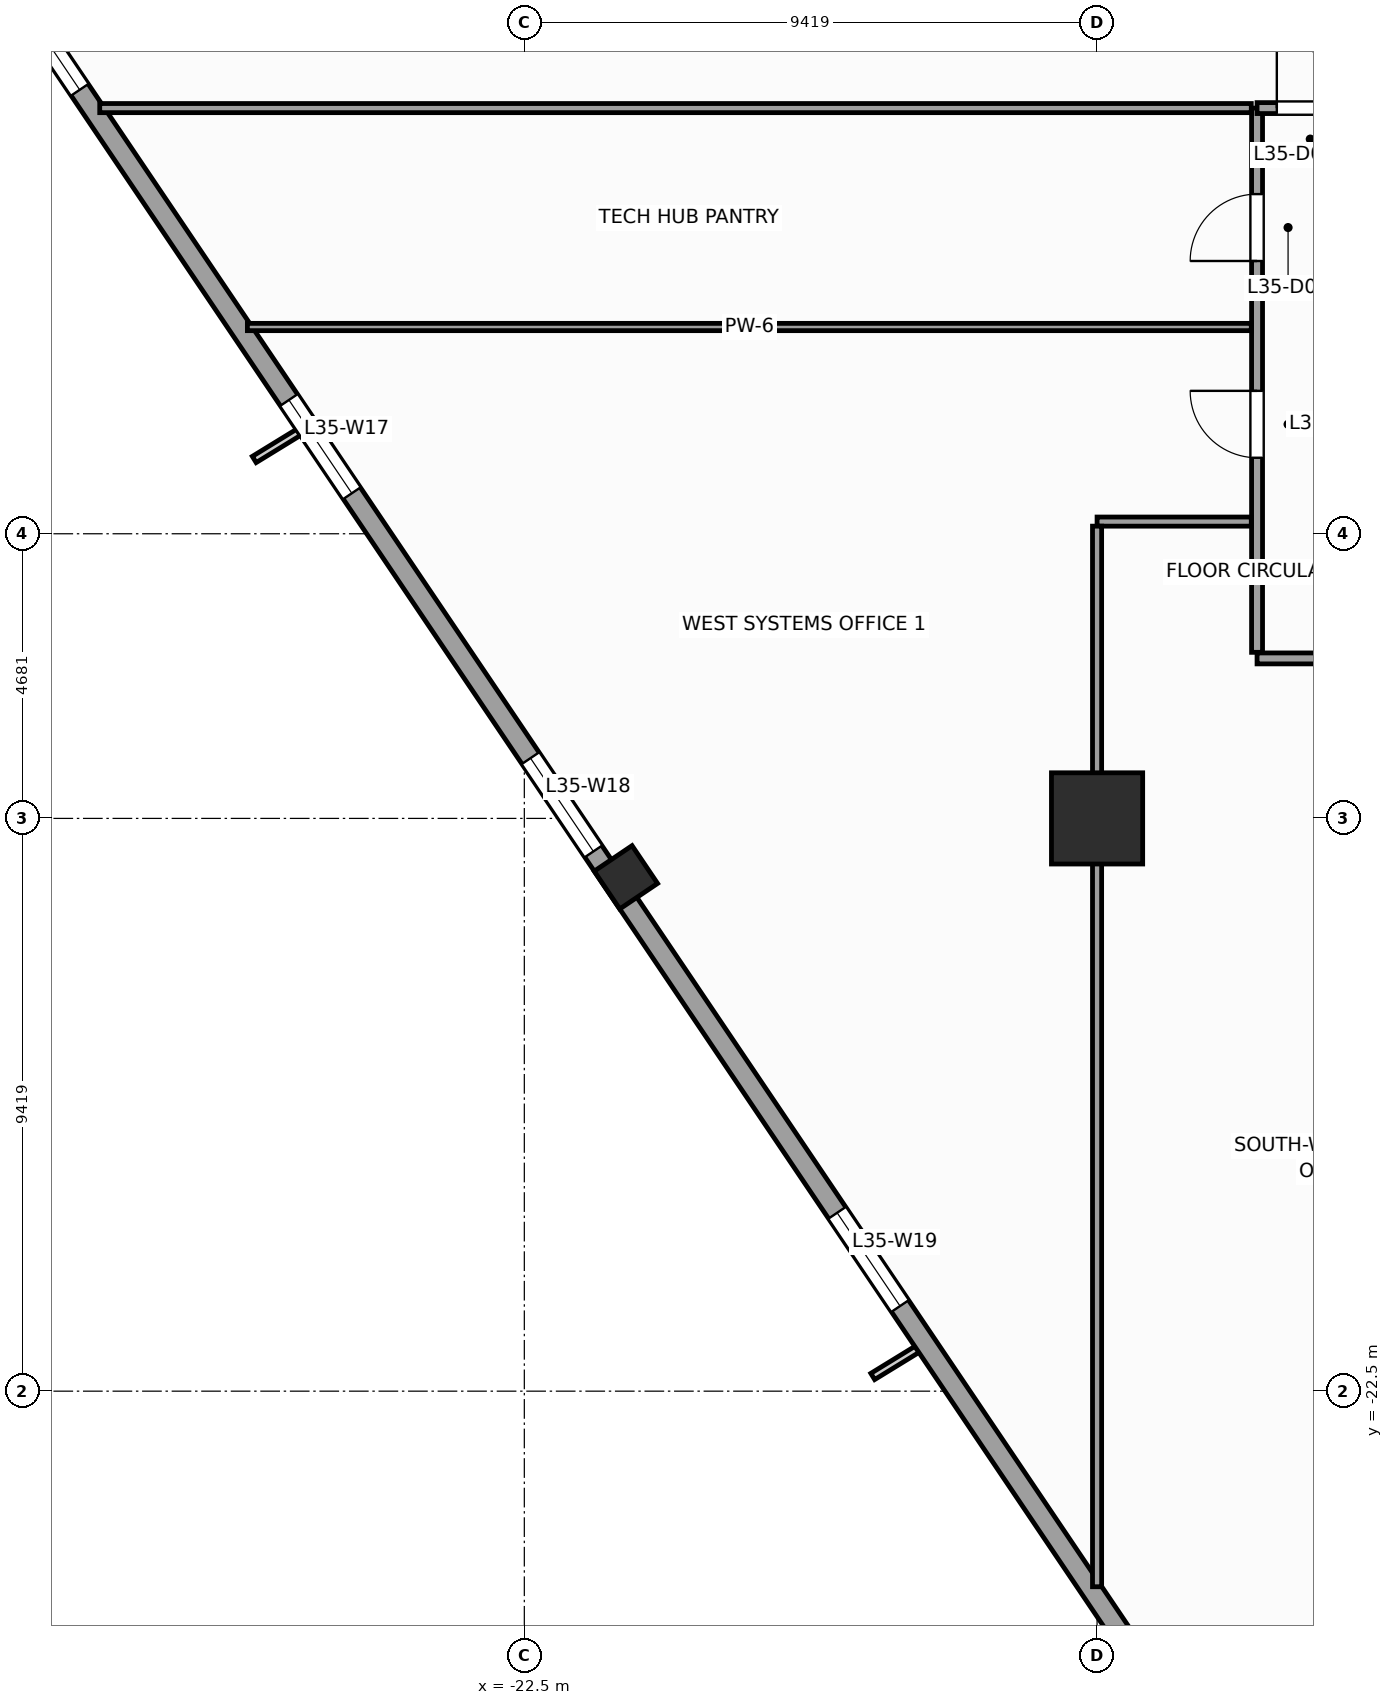
"""IFC4 building model, lengths in metres.
Left out: names, types, materials, properties, quantities, classifications, styles, units other than length and angle.
Written with IfcOpenShell. Run it as: python <this file> out.ifc"""

import sys

from ifc_helpers import new_model, si_unit, direction, frame, frame_2d, origin, origin_2d, place, context, subcontext, project, spatial, rectangle, extrude, source, transform, mapped, element, fill, save


model = new_model("IFC4")
c1 = context("Model", 3, precision=1e-05, world=origin(), true_north=direction((0.0, 1.0)))
c2 = subcontext(c1, "Body", "Model", "MODEL_VIEW")
j1 = project(units=[si_unit("LENGTHUNIT", "METRE"), si_unit("PLANEANGLEUNIT", "RADIAN")], contexts=[c1])
p1 = place(None, origin())
s1 = spatial("IfcSite", under=j1, at=p1, CompositionType="ELEMENT")
p2 = place(p1, origin())
s2 = spatial("IfcBuilding", under=s1, at=p2, CompositionType="ELEMENT")
p3 = place(p2, frame((0.0, 0.0, 148.4)))
s3 = spatial("IfcBuildingStorey", under=s2, at=p3, CompositionType="ELEMENT", Elevation=148.4)
m1 = source(origin(), c2, "Body", "SweptSolid", [
    extrude(rectangle(XDim=1.5, YDim=1.5, at=origin_2d()), origin(), (0.0, 0.0, 1.0), 4.0),
])
p4 = place(p3, frame((-13.081, -13.081, 0.0), z_axis=(0.0, 0.0, 1.0), x_axis=(1.0, 0.0, 0.0)))
e1 = element("IfcColumn", 1, at=p4, inside=s3, PredefinedType="COLUMN", context=c2, shape_type="MappedRepresentation", body=[
    mapped(m1, transform((0.0, 0.0, 0.0), scale=1.0)),
])
m2 = source(origin(), c2, "Body", "SweptSolid", [
    extrude(rectangle(XDim=0.75, YDim=0.75, at=origin_2d()), origin(), (0.0, 0.0, 1.0), 4.0),
])
p5 = place(p3, frame((-20.83, -14.05, 0.0), z_axis=(0.0, 0.0, 1.0), x_axis=(0.829037572555, 0.559192903471, 0.0)))
e2 = element("IfcColumn", 2, at=p5, inside=s3, PredefinedType="COLUMN", context=c2, shape_type="MappedRepresentation", body=[
    mapped(m2, transform((0.0, 0.0, 0.0), scale=1.0)),
])
p6 = place(p3, frame((-32.558, 2.972, 0.0), z_axis=(0.0, 0.0, 1.0), x_axis=(0.559194910251, -0.829036218961, 0.0)))
e3 = element("IfcWall", 3, at=p6, inside=s3, PredefinedType="STANDARD", context=c2, shape_type="SweptSolid", body=[
    extrude(rectangle(XDim=41.34, YDim=0.34, at=frame_2d((20.67, 0.0))), origin(), (0.0, 0.0, 1.0), 3.04),
])
p7 = place(p6, frame((3.511, 0.0, 0.56)))
e4 = element("IfcOpeningElement", 4, at=p7, cuts=e3, PredefinedType="OPENING", context=c2, shape_type="SweptSolid", body=[
    extrude(rectangle(XDim=1.4, YDim=2.4, at=frame_2d((0.7, 1.2))), frame((0.0, 0.18, 0.0), z_axis=(0.0, -1.0, 0.0), x_axis=(1.0, 0.0, 0.0)), (0.0, 0.0, 1.0), 0.36),
])
p8 = place(p6, frame((11.064, 0.0, 0.61)))
e5 = element("IfcOpeningElement", 5, at=p8, cuts=e3, PredefinedType="OPENING", context=c2, shape_type="SweptSolid", body=[
    extrude(rectangle(XDim=1.85, YDim=2.35, at=frame_2d((0.925, 1.175))), frame((0.0, 0.18, 0.0), z_axis=(0.0, -1.0, 0.0), x_axis=(1.0, 0.0, 0.0)), (0.0, 0.0, 1.0), 0.36),
])
p9 = place(p6, frame((18.168, 0.0, 0.61)))
e6 = element("IfcOpeningElement", 6, at=p9, cuts=e3, PredefinedType="OPENING", context=c2, shape_type="SweptSolid", body=[
    extrude(rectangle(XDim=1.85, YDim=2.35, at=frame_2d((0.925, 1.175))), frame((0.0, 0.18, 0.0), z_axis=(0.0, -1.0, 0.0), x_axis=(1.0, 0.0, 0.0)), (0.0, 0.0, 1.0), 0.36),
])
p10 = place(p6, frame((27.186, 0.0, 0.61)))
e7 = element("IfcOpeningElement", 7, at=p10, cuts=e3, PredefinedType="OPENING", context=c2, shape_type="SweptSolid", body=[
    extrude(rectangle(XDim=1.85, YDim=2.35, at=frame_2d((0.925, 1.175))), frame((0.0, 0.18, 0.0), z_axis=(0.0, -1.0, 0.0), x_axis=(1.0, 0.0, 0.0)), (0.0, 0.0, 1.0), 0.36),
])
p11 = place(p6, frame((35.602, 0.0, 0.56)))
e8 = element("IfcOpeningElement", 8, at=p11, cuts=e3, PredefinedType="OPENING", context=c2, shape_type="SweptSolid", body=[
    extrude(rectangle(XDim=1.4, YDim=2.4, at=frame_2d((0.7, 1.2))), frame((0.0, 0.18, 0.0), z_axis=(0.0, -1.0, 0.0), x_axis=(1.0, 0.0, 0.0)), (0.0, 0.0, 1.0), 0.36),
])
p12 = place(p3, frame((-10.45, -10.45, 0.0), z_axis=(0.0, 0.0, 1.0), x_axis=(1.0, 0.0, 0.0)))
e9 = element("IfcWall", 9, at=p12, inside=s3, PredefinedType="PARTITIONING", context=c2, shape_type="SweptSolid", body=[
    extrude(rectangle(XDim=20.9, YDim=0.18, at=frame_2d((10.45, 0.0))), origin(), (0.0, 0.0, 1.0), 3.74),
])
p13 = place(p12, frame((2.339, 0.0, 0.0)))
e10 = element("IfcOpeningElement", 10, at=p13, cuts=e9, PredefinedType="OPENING", context=c2, shape_type="SweptSolid", body=[
    extrude(rectangle(XDim=1.1, YDim=2.2, at=frame_2d((0.55, 1.1))), frame((0.0, 0.1, 0.0), z_axis=(0.0, -1.0, 0.0), x_axis=(1.0, 0.0, 0.0)), (0.0, 0.0, 1.0), 0.2),
])
p14 = place(p12, frame((7.4, 0.0, 0.0)))
e11 = element("IfcOpeningElement", 11, at=p14, cuts=e9, PredefinedType="OPENING", context=c2, shape_type="SweptSolid", body=[
    extrude(rectangle(XDim=1.1, YDim=2.2, at=frame_2d((0.55, 1.1))), frame((0.0, 0.1, 0.0), z_axis=(0.0, -1.0, 0.0), x_axis=(1.0, 0.0, 0.0)), (0.0, 0.0, 1.0), 0.2),
])
p15 = place(p12, frame((12.4, 0.0, 0.0)))
e12 = element("IfcOpeningElement", 12, at=p15, cuts=e9, PredefinedType="OPENING", context=c2, shape_type="SweptSolid", body=[
    extrude(rectangle(XDim=1.1, YDim=2.2, at=frame_2d((0.55, 1.1))), frame((0.0, 0.1, 0.0), z_axis=(0.0, -1.0, 0.0), x_axis=(1.0, 0.0, 0.0)), (0.0, 0.0, 1.0), 0.2),
])
p16 = place(p12, frame((17.46, 0.0, 0.0)))
e13 = element("IfcOpeningElement", 13, at=p16, cuts=e9, PredefinedType="OPENING", context=c2, shape_type="SweptSolid", body=[
    extrude(rectangle(XDim=1.1, YDim=2.2, at=frame_2d((0.55, 1.1))), frame((0.0, 0.1, 0.0), z_axis=(0.0, -1.0, 0.0), x_axis=(1.0, 0.0, 0.0)), (0.0, 0.0, 1.0), 0.2),
])
p17 = place(p3, frame((-10.45, -10.35, 0.0), z_axis=(0.0, 0.0, 1.0), x_axis=(0.0, 1.0, 0.0)))
e14 = element("IfcWall", 14, at=p17, inside=s3, PredefinedType="PARTITIONING", context=c2, shape_type="SweptSolid", body=[
    extrude(rectangle(XDim=8.95, YDim=0.18, at=frame_2d((4.475, 0.0))), origin(), (0.0, 0.0, 1.0), 3.74),
])
p18 = place(p17, frame((6.436, 0.0, 0.0)))
e15 = element("IfcOpeningElement", 15, at=p18, cuts=e14, PredefinedType="OPENING", context=c2, shape_type="SweptSolid", body=[
    extrude(rectangle(XDim=1.1, YDim=2.2, at=frame_2d((0.55, 1.1))), frame((0.0, 0.1, 0.0), z_axis=(0.0, -1.0, 0.0), x_axis=(1.0, 0.0, 0.0)), (0.0, 0.0, 1.0), 0.2),
])
p19 = place(p17, frame((3.2, 0.0, 0.0)))
e16 = element("IfcOpeningElement", 16, at=p19, cuts=e14, PredefinedType="OPENING", context=c2, shape_type="SweptSolid", body=[
    extrude(rectangle(XDim=1.1, YDim=2.2, at=frame_2d((0.55, 1.1))), frame((0.0, 0.1, 0.0), z_axis=(0.0, -1.0, 0.0), x_axis=(1.0, 0.0, 0.0)), (0.0, 0.0, 1.0), 0.2),
])
p20 = place(p3, frame((-10.45, -1.4, 0.0), z_axis=(0.0, 0.0, 1.0), x_axis=(1.0, 0.0, 0.0)))
e17 = element("IfcWall", 17, at=p20, inside=s3, PredefinedType="PARTITIONING", context=c2, shape_type="SweptSolid", body=[
    extrude(rectangle(XDim=1.75, YDim=0.18, at=frame_2d((0.875, 0.0))), origin(), (0.0, 0.0, 1.0), 3.74),
])
p21 = place(p20, frame((0.325, 0.0, 0.0)))
e18 = element("IfcOpeningElement", 18, at=p21, cuts=e17, PredefinedType="OPENING", context=c2, shape_type="SweptSolid", body=[
    extrude(rectangle(XDim=1.1, YDim=2.2, at=frame_2d((0.55, 1.1))), frame((0.0, 0.1, 0.0), z_axis=(0.0, -1.0, 0.0), x_axis=(1.0, 0.0, 0.0)), (0.0, 0.0, 1.0), 0.2),
])
p22 = place(p3, frame((-29.482, -1.4, 0.0), z_axis=(0.0, 0.0, 1.0), x_axis=(1.0, 0.0, 0.0)))
e19 = element("IfcWall", 19, at=p22, inside=s3, PredefinedType="PARTITIONING", context=c2, shape_type="SweptSolid", body=[
    extrude(rectangle(XDim=18.938, YDim=0.15, at=frame_2d((9.469, 0.0))), origin(), (0.0, 0.0, 1.0), 3.74),
])
p23 = place(p3, frame((-10.545, -8.2, 0.0), z_axis=(0.0, 0.0, 1.0), x_axis=(-1.0, 0.0, 0.0)))
e20 = element("IfcWall", 20, at=p23, inside=s3, PredefinedType="PARTITIONING", context=c2, shape_type="SweptSolid", body=[
    extrude(rectangle(XDim=2.536, YDim=0.15, at=frame_2d((1.268, 0.0))), origin(), (0.0, 0.0, 1.0), 3.74),
])
p24 = place(p3, frame((-13.081, -8.275, 0.0), z_axis=(0.0, 0.0, 1.0), x_axis=(0.0, -1.0, 0.0)))
e21 = element("IfcWall", 21, at=p24, inside=s3, PredefinedType="PARTITIONING", context=c2, shape_type="SweptSolid", body=[
    extrude(rectangle(XDim=17.441, YDim=0.15, at=frame_2d((8.721, 0.0))), origin(), (0.0, 0.0, 1.0), 2.84),
])
p25 = place(p3, frame((-27.054, -5.0, 0.0), z_axis=(0.0, 0.0, 1.0), x_axis=(1.0, 0.0, 0.0)))
e22 = element("IfcWall", 22, at=p25, inside=s3, PredefinedType="PARTITIONING", context=c2, shape_type="SweptSolid", body=[
    extrude(rectangle(XDim=16.509, YDim=0.12, at=frame_2d((8.255, 0.0))), origin(), (0.0, 0.0, 1.0), 3.74),
])
m3 = source(origin(), c2, "Body", "SweptSolid", [
    extrude(rectangle(XDim=1.4, YDim=2.4, at=frame_2d((0.7, 1.2))), frame((0.0, 0.03, 0.0), z_axis=(0.0, -1.0, 0.0), x_axis=(1.0, 0.0, 0.0)), (0.0, 0.0, 1.0), 0.06),
])
p26 = place(p7, origin())
e23 = element("IfcWindow", 23, at=p26, inside=s3, PartitioningType="SINGLE_PANEL", PredefinedType="WINDOW", context=c2, shape_type="MappedRepresentation", body=[
    mapped(m3, transform((0.0, 0.0, 0.0), scale=1.0)),
])
fill(e4, e23)
m4 = source(origin(), c2, "Body", "SweptSolid", [
    extrude(rectangle(XDim=1.85, YDim=2.35, at=frame_2d((0.925, 1.175))), frame((0.0, 0.03, 0.0), z_axis=(0.0, -1.0, 0.0), x_axis=(1.0, 0.0, 0.0)), (0.0, 0.0, 1.0), 0.06),
])
p27 = place(p8, origin())
e24 = element("IfcWindow", 24, at=p27, inside=s3, PartitioningType="SINGLE_PANEL", PredefinedType="WINDOW", context=c2, shape_type="MappedRepresentation", body=[
    mapped(m4, transform((0.0, 0.0, 0.0), scale=1.0)),
])
fill(e5, e24)
p28 = place(p9, origin())
e25 = element("IfcWindow", 25, at=p28, inside=s3, PartitioningType="SINGLE_PANEL", PredefinedType="WINDOW", context=c2, shape_type="MappedRepresentation", body=[
    mapped(m4, transform((0.0, 0.0, 0.0), scale=1.0)),
])
fill(e6, e25)
p29 = place(p10, origin())
e26 = element("IfcWindow", 26, at=p29, inside=s3, PartitioningType="SINGLE_PANEL", PredefinedType="WINDOW", context=c2, shape_type="MappedRepresentation", body=[
    mapped(m4, transform((0.0, 0.0, 0.0), scale=1.0)),
])
fill(e7, e26)
m5 = source(origin(), c2, "Body", "SweptSolid", [
    extrude(rectangle(XDim=1.1, YDim=2.2, at=frame_2d((0.55, 1.1))), frame((0.0, 0.025, 0.0), z_axis=(0.0, -1.0, 0.0), x_axis=(1.0, 0.0, 0.0)), (0.0, 0.0, 1.0), 0.05),
])
p30 = place(p21, origin())
e27 = element("IfcDoor", 27, at=p30, inside=s3, OperationType="SINGLE_SWING_LEFT", PredefinedType="DOOR", context=c2, shape_type="MappedRepresentation", body=[
    mapped(m5, transform((0.0, 0.0, 0.0), scale=1.0)),
])
fill(e18, e27)
p31 = place(p18, origin())
e28 = element("IfcDoor", 28, at=p31, inside=s3, OperationType="SINGLE_SWING_LEFT", PredefinedType="DOOR", context=c2, shape_type="MappedRepresentation", body=[
    mapped(m5, transform((0.0, 0.0, 0.0), scale=1.0)),
])
fill(e15, e28)
p32 = place(p19, origin())
e29 = element("IfcDoor", 29, at=p32, inside=s3, OperationType="SINGLE_SWING_RIGHT", PredefinedType="DOOR", context=c2, shape_type="MappedRepresentation", body=[
    mapped(m5, transform((0.0, 0.0, 0.0), scale=1.0)),
])
fill(e16, e29)
save(model, sys.argv[1])
